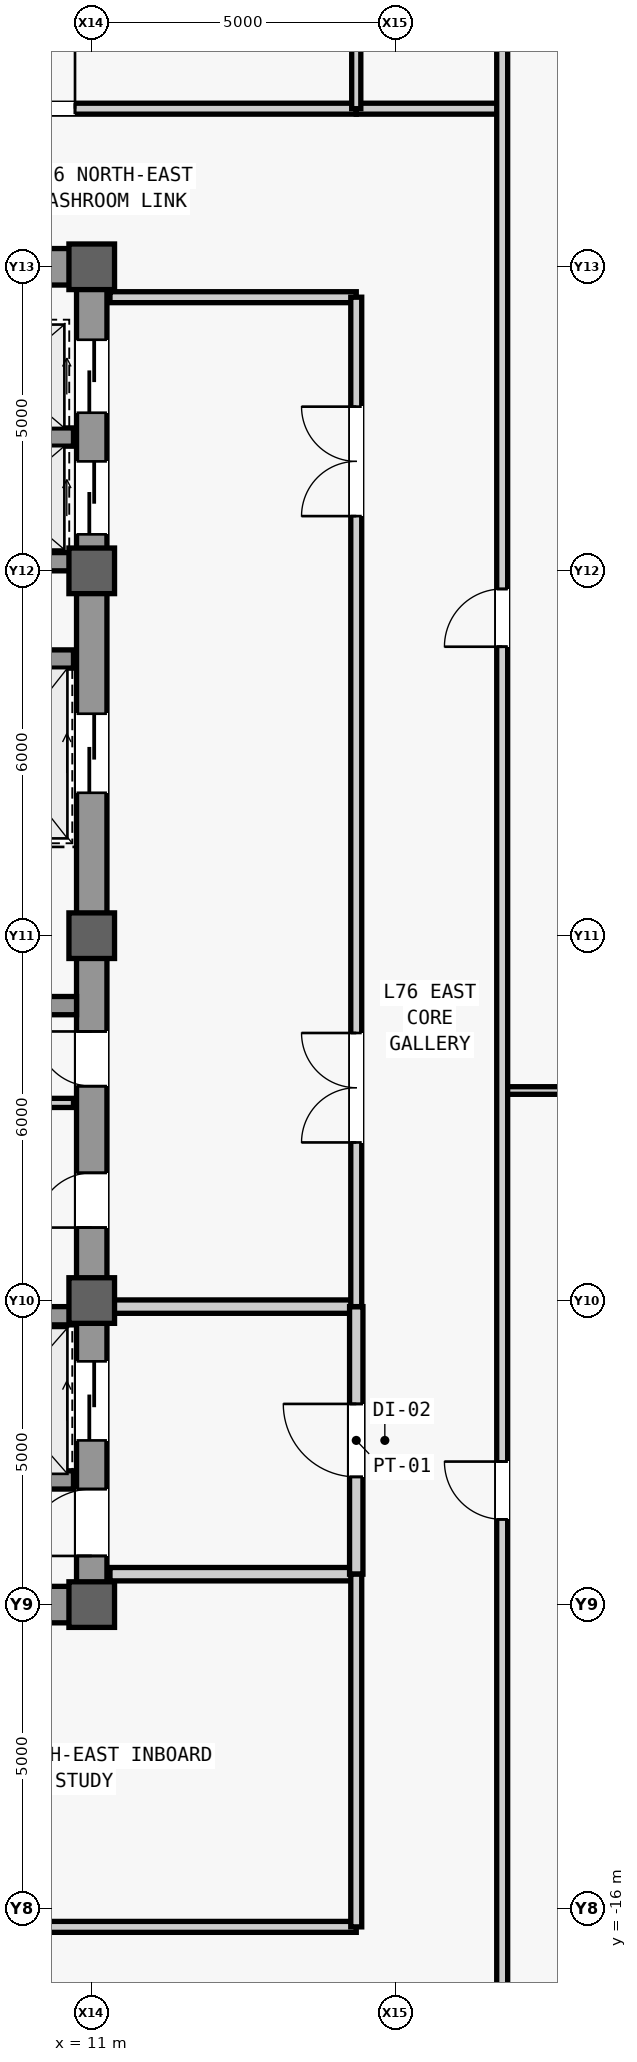
"""IFC4 building model, lengths in metres.
Left out: names, types, materials, properties, quantities, classifications, styles, units other than length and angle.
Written with IfcOpenShell. Run it as: python <this file> out.ifc"""

import sys

from ifc_helpers import new_model, si_unit, direction, frame, frame_2d, origin, origin_2d, place, context, subcontext, project, spatial, rectangle, extrude, source, transform, mapped, element, fill, save


model = new_model("IFC4")
c1 = context("Model", 3, precision=1e-05, world=origin(), true_north=direction((0.0, 1.0)))
c2 = subcontext(c1, "Body", "Model", "MODEL_VIEW")
j1 = project(units=[si_unit("LENGTHUNIT", "METRE"), si_unit("PLANEANGLEUNIT", "RADIAN")], contexts=[c1])
p1 = place(None, origin())
s1 = spatial("IfcSite", under=j1, at=p1, CompositionType="ELEMENT")
p2 = place(p1, origin())
s2 = spatial("IfcBuilding", under=s1, at=p2, CompositionType="ELEMENT")
p3 = place(p2, frame((0.0, 0.0, 321.5)))
s3 = spatial("IfcBuildingStorey", under=s2, at=p3, CompositionType="ELEMENT", Elevation=321.5)
m1 = source(origin(), c2, "Body", "SweptSolid", [
    extrude(rectangle(XDim=22.0, YDim=0.5, at=frame_2d((11.0, 0.0))), origin(), (0.0, 0.0, 1.0), 4.54),
])
p4 = place(p3, frame((11.0, -11.0, 0.0), z_axis=(0.0, 0.0, 1.0), x_axis=(0.0, 1.0, 0.0)))
e1 = element("IfcWall", 1, at=p4, inside=s3, PredefinedType="SHEAR", context=c2, shape_type="MappedRepresentation", body=[
    mapped(m1, transform((0.0, 0.0, 0.0), scale=1.0)),
])
m2 = source(origin(), c2, "Body", "SweptSolid", [
    extrude(rectangle(XDim=1.1, YDim=2.2, at=frame_2d((0.55, 1.1))), frame((0.0, 0.26, 0.0), z_axis=(0.0, -1.0, 0.0), x_axis=(1.0, 0.0, 0.0)), (0.0, 0.0, 1.0), 0.52),
])
p5 = place(p4, frame((0.8, 0.0, 0.0)))
e2 = element("IfcOpeningElement", 2, at=p5, cuts=e1, PredefinedType="OPENING", context=c2, shape_type="MappedRepresentation", body=[
    mapped(m2, transform((0.0, 0.0, 0.0), scale=1.0)),
])
m3 = source(origin(), c2, "Body", "SweptSolid", [
    extrude(rectangle(XDim=0.9, YDim=2.15, at=frame_2d((0.45, 1.075))), frame((0.0, 0.26, 0.0), z_axis=(0.0, -1.0, 0.0), x_axis=(1.0, 0.0, 0.0)), (0.0, 0.0, 1.0), 0.52),
])
p6 = place(p4, frame((6.2, 0.0, 0.0)))
e3 = element("IfcOpeningElement", 3, at=p6, cuts=e1, PredefinedType="OPENING", context=c2, shape_type="MappedRepresentation", body=[
    mapped(m3, transform((0.0, 0.0, 0.0), scale=1.0)),
])
p7 = place(p4, frame((8.525, 0.0, 0.0)))
e4 = element("IfcOpeningElement", 4, at=p7, cuts=e1, PredefinedType="OPENING", context=c2, shape_type="MappedRepresentation", body=[
    mapped(m3, transform((0.0, 0.0, 0.0), scale=1.0)),
])
m4 = source(origin(), c2, "Body", "SweptSolid", [
    extrude(rectangle(XDim=1.2, YDim=2.3, at=frame_2d((0.6, 1.15))), frame((0.0, 0.26, 0.0), z_axis=(0.0, -1.0, 0.0), x_axis=(1.0, 0.0, 0.0)), (0.0, 0.0, 1.0), 0.52),
])
p8 = place(p4, frame((17.6, 0.0, 0.0)))
e5 = element("IfcOpeningElement", 5, at=p8, cuts=e1, PredefinedType="OPENING", context=c2, shape_type="MappedRepresentation", body=[
    mapped(m4, transform((0.0, 0.0, 0.0), scale=1.0)),
])
p9 = place(p4, frame((19.6, 0.0, 0.0)))
e6 = element("IfcOpeningElement", 6, at=p9, cuts=e1, PredefinedType="OPENING", context=c2, shape_type="MappedRepresentation", body=[
    mapped(m4, transform((0.0, 0.0, 0.0), scale=1.0)),
])
m5 = source(origin(), c2, "Body", "SweptSolid", [
    extrude(rectangle(XDim=1.3, YDim=2.3, at=frame_2d((0.65, 1.15))), frame((0.0, 0.26, 0.0), z_axis=(0.0, -1.0, 0.0), x_axis=(1.0, 0.0, 0.0)), (0.0, 0.0, 1.0), 0.52),
])
p10 = place(p4, frame((2.7, 0.0, 0.0)))
e7 = element("IfcOpeningElement", 7, at=p10, cuts=e1, PredefinedType="OPENING", context=c2, shape_type="MappedRepresentation", body=[
    mapped(m5, transform((0.0, 0.0, 0.0), scale=1.0)),
])
p11 = place(p4, frame((13.35, 0.0, 0.0)))
e8 = element("IfcOpeningElement", 8, at=p11, cuts=e1, PredefinedType="OPENING", context=c2, shape_type="MappedRepresentation", body=[
    mapped(m5, transform((0.0, 0.0, 0.0), scale=1.0)),
])
m6 = source(origin(), c2, "Body", "SweptSolid", [
    extrude(rectangle(XDim=5.9, YDim=0.6, at=frame_2d((2.95, 0.0))), origin(), (0.0, 0.0, 1.0), 4.54),
])
p12 = place(p3, frame((4.85, -11.0, 0.0), z_axis=(0.0, 0.0, 1.0), x_axis=(1.0, 0.0, 0.0)))
e9 = element("IfcWall", 9, at=p12, inside=s3, PredefinedType="SHEAR", context=c2, shape_type="MappedRepresentation", body=[
    mapped(m6, transform((0.0, 0.0, 0.0), scale=1.0)),
])
p13 = place(p3, frame((4.85, 11.0, 0.0), z_axis=(0.0, 0.0, 1.0), x_axis=(1.0, 0.0, 0.0)))
e10 = element("IfcWall", 10, at=p13, inside=s3, PredefinedType="SHEAR", context=c2, shape_type="MappedRepresentation", body=[
    mapped(m6, transform((0.0, 0.0, 0.0), scale=1.0)),
])
m7 = source(origin(), c2, "Body", "SweptSolid", [
    extrude(rectangle(XDim=1.05, YDim=2.2, at=frame_2d((0.525, 1.1))), frame((0.0, 0.31, 0.0), z_axis=(0.0, -1.0, 0.0), x_axis=(1.0, 0.0, 0.0)), (0.0, 0.0, 1.0), 0.62),
])
p14 = place(p13, frame((1.375, 0.0, 0.0)))
e11 = element("IfcOpeningElement", 11, at=p14, cuts=e10, PredefinedType="OPENING", context=c2, shape_type="MappedRepresentation", body=[
    mapped(m7, transform((0.0, 0.0, 0.0), scale=1.0)),
])
m8 = source(origin(), c2, "Body", "SweptSolid", [
    extrude(rectangle(XDim=5.65, YDim=0.3, at=frame_2d((2.825, 0.0))), origin(), (0.0, 0.0, 1.0), 4.54),
])
p15 = place(p3, frame((5.1, -1.15, 0.0), z_axis=(0.0, 0.0, 1.0), x_axis=(1.0, 0.0, 0.0)))
e12 = element("IfcWall", 12, at=p15, inside=s3, PredefinedType="SHEAR", context=c2, shape_type="MappedRepresentation", body=[
    mapped(m8, transform((0.0, 0.0, 0.0), scale=1.0)),
])
m9 = source(origin(), c2, "Body", "SweptSolid", [
    extrude(rectangle(XDim=0.75, YDim=0.75, at=origin_2d()), origin(), (0.0, 0.0, 1.0), 4.8),
])
for number, where, z_axis, x_axis in (
    (13, (11.0, -11.0, 0.0), (0.0, 0.0, 1.0), (1.0, 0.0, 0.0)),
    (14, (11.0, -6.0, 0.0), (0.0, 0.0, 1.0), (1.0, 0.0, 0.0)),
    (15, (11.0, 0.0, 0.0), (0.0, 0.0, 1.0), (1.0, 0.0, 0.0)),
    (16, (11.0, 6.0, 0.0), (0.0, 0.0, 1.0), (1.0, 0.0, 0.0)),
    (17, (11.0, 11.0, 0.0), (0.0, 0.0, 1.0), (1.0, 0.0, 0.0)),
):
    element("IfcColumn", number, at=place(p3, frame(where, z_axis=z_axis, x_axis=x_axis)), inside=s3, PredefinedType="COLUMN", context=c2, shape_type="MappedRepresentation", body=[
        mapped(m9, transform((0.0, 0.0, 0.0), scale=1.0)),
    ])
m10 = source(origin(), c2, "Body", "SweptSolid", [
    extrude(rectangle(XDim=2.2, YDim=0.3, at=frame_2d((1.1, 0.0))), origin(), (0.0, 0.0, 1.0), 4.54),
])
for number, where, z_axis, x_axis in (
    (18, (8.5, -8.95, 0.0), (0.0, 0.0, 1.0), (1.0, 0.0, 0.0)),
    (19, (8.5, -6.25, 0.0), (0.0, 0.0, 1.0), (1.0, 0.0, 0.0)),
):
    element("IfcWall", number, at=place(p3, frame(where, z_axis=z_axis, x_axis=x_axis)), inside=s3, PredefinedType="SHEAR", context=c2, shape_type="MappedRepresentation", body=[
        mapped(m10, transform((0.0, 0.0, 0.0), scale=1.0)),
    ])
m11 = source(origin(), c2, "Body", "SweptSolid", [
    extrude(rectangle(XDim=2.3, YDim=0.3, at=frame_2d((1.15, 0.0))), origin(), (0.0, 0.0, 1.0), 4.54),
])
for number, where, z_axis, x_axis in (
    (20, (8.4, 4.55, 0.0), (0.0, 0.0, 1.0), (1.0, 0.0, 0.0)),
    (21, (8.4, 6.15, 0.0), (0.0, 0.0, 1.0), (1.0, 0.0, 0.0)),
    (22, (8.4, 8.2, 0.0), (0.0, 0.0, 1.0), (1.0, 0.0, 0.0)),
):
    element("IfcWall", number, at=place(p3, frame(where, z_axis=z_axis, x_axis=x_axis)), inside=s3, PredefinedType="SHEAR", context=c2, shape_type="MappedRepresentation", body=[
        mapped(m11, transform((0.0, 0.0, 0.0), scale=1.0)),
    ])
m12 = source(origin(), c2, "Body", "SweptSolid", [
    extrude(rectangle(XDim=2.05, YDim=0.15, at=frame_2d((1.025, 0.0))), origin(), (0.0, 0.0, 1.0), 4.54),
])
p16 = place(p3, frame((8.65, -2.75, 0.0), z_axis=(0.0, 0.0, 1.0), x_axis=(1.0, 0.0, 0.0)))
e23 = element("IfcWall", 23, at=p16, inside=s3, PredefinedType="PARTITIONING", context=c2, shape_type="MappedRepresentation", body=[
    mapped(m12, transform((0.0, 0.0, 0.0), scale=1.0)),
])
m13 = source(origin(), c2, "Body", "SweptSolid", [
    extrude(rectangle(XDim=4.05, YDim=0.22, at=frame_2d((2.025, 0.0))), origin(), (0.0, 0.0, 1.0), 4.54),
])
p17 = place(p3, frame((11.3, -10.5, 0.0), z_axis=(0.0, 0.0, 1.0), x_axis=(1.0, 0.0, 0.0)))
e24 = element("IfcWall", 24, at=p17, inside=s3, PredefinedType="PARTITIONING", context=c2, shape_type="MappedRepresentation", body=[
    mapped(m13, transform((0.0, 0.0, 0.0), scale=1.0)),
])
m14 = source(origin(), c2, "Body", "SweptSolid", [
    extrude(rectangle(XDim=4.05, YDim=0.22, at=frame_2d((2.025, 0.0))), origin(), (0.0, 0.0, 1.0), 2.74),
])
p18 = place(p3, frame((11.3, -6.1, 0.0), z_axis=(0.0, 0.0, 1.0), x_axis=(1.0, 0.0, 0.0)))
e25 = element("IfcWall", 25, at=p18, inside=s3, PredefinedType="PARTITIONING", context=c2, shape_type="MappedRepresentation", body=[
    mapped(m14, transform((0.0, 0.0, 0.0), scale=1.0)),
])
m15 = source(origin(), c2, "Body", "SweptSolid", [
    extrude(rectangle(XDim=4.4, YDim=0.22, at=frame_2d((2.2, 0.0))), origin(), (0.0, 0.0, 1.0), 4.54),
])
p19 = place(p3, frame((15.35, -10.5, 0.0), z_axis=(0.0, 0.0, 1.0), x_axis=(0.0, 1.0, 0.0)))
e26 = element("IfcWall", 26, at=p19, inside=s3, PredefinedType="PARTITIONING", context=c2, shape_type="MappedRepresentation", body=[
    mapped(m15, transform((0.0, 0.0, 0.0), scale=1.0)),
])
m16 = source(origin(), c2, "Body", "SweptSolid", [
    extrude(rectangle(XDim=1.2, YDim=2.2, at=frame_2d((0.6, 1.1))), frame((0.0, 0.12, 0.0), z_axis=(0.0, -1.0, 0.0), x_axis=(1.0, 0.0, 0.0)), (0.0, 0.0, 1.0), 0.24),
])
p20 = place(p19, frame((1.6, 0.0, 0.0)))
e27 = element("IfcOpeningElement", 27, at=p20, cuts=e26, PredefinedType="OPENING", context=c2, shape_type="MappedRepresentation", body=[
    mapped(m16, transform((0.0, 0.0, 0.0), scale=1.0)),
])
m17 = source(origin(), c2, "Body", "SweptSolid", [
    extrude(rectangle(XDim=4.05, YDim=0.18, at=frame_2d((2.025, 0.0))), origin(), (0.0, 0.0, 1.0), 4.54),
])
p21 = place(p3, frame((11.3, 10.5, 0.0), z_axis=(0.0, 0.0, 1.0), x_axis=(1.0, 0.0, 0.0)))
e28 = element("IfcWall", 28, at=p21, inside=s3, PredefinedType="PARTITIONING", context=c2, shape_type="MappedRepresentation", body=[
    mapped(m17, transform((0.0, 0.0, 0.0), scale=1.0)),
])
m18 = source(origin(), c2, "Body", "SweptSolid", [
    extrude(rectangle(XDim=16.6, YDim=0.18, at=frame_2d((8.3, 0.0))), origin(), (0.0, 0.0, 1.0), 4.54),
])
p22 = place(p3, frame((15.35, -6.1, 0.0), z_axis=(0.0, 0.0, 1.0), x_axis=(0.0, 1.0, 0.0)))
e29 = element("IfcWall", 29, at=p22, inside=s3, PredefinedType="PARTITIONING", context=c2, shape_type="MappedRepresentation", body=[
    mapped(m18, transform((0.0, 0.0, 0.0), scale=1.0)),
])
m19 = source(origin(), c2, "Body", "SweptSolid", [
    extrude(rectangle(XDim=1.8, YDim=2.25, at=frame_2d((0.9, 1.125))), frame((0.0, 0.1, 0.0), z_axis=(0.0, -1.0, 0.0), x_axis=(1.0, 0.0, 0.0)), (0.0, 0.0, 1.0), 0.2),
])
p23 = place(p22, frame((2.7, 0.0, 0.0)))
e30 = element("IfcOpeningElement", 30, at=p23, cuts=e29, PredefinedType="OPENING", context=c2, shape_type="MappedRepresentation", body=[
    mapped(m19, transform((0.0, 0.0, 0.0), scale=1.0)),
])
p24 = place(p22, frame((13.0, 0.0, 0.0)))
e31 = element("IfcOpeningElement", 31, at=p24, cuts=e29, PredefinedType="OPENING", context=c2, shape_type="MappedRepresentation", body=[
    mapped(m19, transform((0.0, 0.0, 0.0), scale=1.0)),
])
m20 = source(origin(), c2, "Body", "SweptSolid", [
    extrude(rectangle(XDim=14.05, YDim=0.18, at=frame_2d((7.025, 0.0))), origin(), (0.0, 0.0, 1.0), 4.54),
])
p25 = place(p3, frame((1.3, -16.3, 0.0), z_axis=(0.0, 0.0, 1.0), x_axis=(1.0, 0.0, 0.0)))
e32 = element("IfcWall", 32, at=p25, inside=s3, PredefinedType="PARTITIONING", context=c2, shape_type="MappedRepresentation", body=[
    mapped(m20, transform((0.0, 0.0, 0.0), scale=1.0)),
])
m21 = source(origin(), c2, "Body", "SweptSolid", [
    extrude(rectangle(XDim=0.9, YDim=2.15, at=frame_2d((0.45, 1.075))), frame((0.0, 0.1, 0.0), z_axis=(0.0, -1.0, 0.0), x_axis=(1.0, 0.0, 0.0)), (0.0, 0.0, 1.0), 0.2),
])
p26 = place(p25, frame((6.25, 0.0, 0.0)))
e33 = element("IfcOpeningElement", 33, at=p26, cuts=e32, PredefinedType="OPENING", context=c2, shape_type="MappedRepresentation", body=[
    mapped(m21, transform((0.0, 0.0, 0.0), scale=1.0)),
])
m22 = source(origin(), c2, "Body", "SweptSolid", [
    extrude(rectangle(XDim=5.8, YDim=0.18, at=frame_2d((2.9, 0.0))), origin(), (0.0, 0.0, 1.0), 4.54),
])
p27 = place(p3, frame((15.35, -16.3, 0.0), z_axis=(0.0, 0.0, 1.0), x_axis=(0.0, 1.0, 0.0)))
e34 = element("IfcWall", 34, at=p27, inside=s3, PredefinedType="PARTITIONING", context=c2, shape_type="MappedRepresentation", body=[
    mapped(m22, transform((0.0, 0.0, 0.0), scale=1.0)),
])
m23 = source(origin(), c2, "Body", "SweptSolid", [
    extrude(rectangle(XDim=2.4, YDim=0.18, at=frame_2d((1.2, 0.0))), origin(), (0.0, 0.0, 1.0), 4.54),
])
p28 = place(p3, frame((15.35, 13.6, 0.0), z_axis=(0.0, 0.0, 1.0), x_axis=(1.0, 0.0, 0.0)))
e35 = element("IfcWall", 35, at=p28, inside=s3, PredefinedType="PARTITIONING", context=c2, shape_type="MappedRepresentation", body=[
    mapped(m23, transform((0.0, 0.0, 0.0), scale=1.0)),
])
m24 = source(origin(), c2, "Body", "SweptSolid", [
    extrude(rectangle(XDim=32.75, YDim=0.18, at=frame_2d((16.375, 0.0))), origin(), (0.0, 0.0, 1.0), 4.54),
])
p29 = place(p3, frame((-17.4, 13.6, 0.0), z_axis=(0.0, 0.0, 1.0), x_axis=(1.0, 0.0, 0.0)))
e36 = element("IfcWall", 36, at=p29, inside=s3, PredefinedType="PARTITIONING", context=c2, shape_type="MappedRepresentation", body=[
    mapped(m24, transform((0.0, 0.0, 0.0), scale=1.0)),
])
m25 = source(origin(), c2, "Body", "SweptSolid", [
    extrude(rectangle(XDim=1.05, YDim=2.2, at=frame_2d((0.525, 1.1))), frame((0.0, 0.1, 0.0), z_axis=(0.0, -1.0, 0.0), x_axis=(1.0, 0.0, 0.0)), (0.0, 0.0, 1.0), 0.2),
])
p30 = place(p29, frame((27.075, 0.0, 0.0)))
e37 = element("IfcOpeningElement", 37, at=p30, cuts=e36, PredefinedType="OPENING", context=c2, shape_type="MappedRepresentation", body=[
    mapped(m25, transform((0.0, 0.0, 0.0), scale=1.0)),
])
m26 = source(origin(), c2, "Body", "SweptSolid", [
    extrude(rectangle(XDim=14.4, YDim=0.15, at=frame_2d((7.2, 0.0))), origin(), (0.0, 0.0, 1.0), 4.54),
])
p31 = place(p3, frame((15.35, 13.6, 0.0), z_axis=(0.0, 0.0, 1.0), x_axis=(0.0, 1.0, 0.0)))
e38 = element("IfcWall", 38, at=p31, inside=s3, PredefinedType="PARTITIONING", context=c2, shape_type="MappedRepresentation", body=[
    mapped(m26, transform((0.0, 0.0, 0.0), scale=1.0)),
])
m27 = source(origin(), c2, "Body", "SweptSolid", [
    extrude(rectangle(XDim=10.25, YDim=0.125, at=frame_2d((5.125, 0.0))), origin(), (0.0, 0.0, 1.0), 4.54),
])
p32 = place(p3, frame((17.75, -2.546, 0.0), z_axis=(0.0, 0.0, 1.0), x_axis=(1.0, 0.0, 0.0)))
e39 = element("IfcWall", 39, at=p32, inside=s3, PredefinedType="PARTITIONING", context=c2, shape_type="MappedRepresentation", body=[
    mapped(m27, transform((0.0, 0.0, 0.0), scale=1.0)),
])
m28 = source(origin(), c2, "Body", "SweptSolid", [
    extrude(rectangle(XDim=41.2, YDim=0.18, at=frame_2d((20.6, 0.0))), origin(), (0.0, 0.0, 1.0), 4.54),
])
p33 = place(p3, frame((17.75, -18.7, 0.0), z_axis=(0.0, 0.0, 1.0), x_axis=(0.0, 1.0, 0.0)))
e40 = element("IfcWall", 40, at=p33, inside=s3, PredefinedType="PARTITIONING", context=c2, shape_type="MappedRepresentation", body=[
    mapped(m28, transform((0.0, 0.0, 0.0), scale=1.0)),
])
m29 = source(origin(), c2, "Body", "SweptSolid", [
    extrude(rectangle(XDim=0.95, YDim=2.15, at=frame_2d((0.475, 1.075))), frame((0.0, 0.1, 0.0), z_axis=(0.0, -1.0, 0.0), x_axis=(1.0, 0.0, 0.0)), (0.0, 0.0, 1.0), 0.2),
])
p34 = place(p33, frame((9.102, 0.0, 0.0)))
e41 = element("IfcOpeningElement", 41, at=p34, cuts=e40, PredefinedType="OPENING", context=c2, shape_type="MappedRepresentation", body=[
    mapped(m29, transform((0.0, 0.0, 0.0), scale=1.0)),
])
p35 = place(p33, frame((23.452, 0.0, 0.0)))
e42 = element("IfcOpeningElement", 42, at=p35, cuts=e40, PredefinedType="OPENING", context=c2, shape_type="MappedRepresentation", body=[
    mapped(m29, transform((0.0, 0.0, 0.0), scale=1.0)),
])
m30 = source(origin(), c2, "Body", "SweptSolid", [
    extrude(rectangle(XDim=1.1, YDim=2.2, at=frame_2d((0.55, 1.1))), frame((0.0, 0.025, 0.0), z_axis=(0.0, -1.0, 0.0), x_axis=(1.0, 0.0, 0.0)), (0.0, 0.0, 1.0), 0.05),
])
p36 = place(p5, origin())
e43 = element("IfcDoor", 43, at=p36, inside=s3, OperationType="SINGLE_SWING_LEFT", PredefinedType="DOOR", context=c2, shape_type="MappedRepresentation", body=[
    mapped(m30, transform((0.0, 0.0, 0.0), scale=1.0)),
])
fill(e2, e43)
m31 = source(origin(), c2, "Body", "SweptSolid", [
    extrude(rectangle(XDim=0.9, YDim=2.15, at=frame_2d((0.45, 1.075))), frame((0.0, 0.025, 0.0), z_axis=(0.0, -1.0, 0.0), x_axis=(1.0, 0.0, 0.0)), (0.0, 0.0, 1.0), 0.05),
])
p37 = place(p6, origin())
e44 = element("IfcDoor", 44, at=p37, inside=s3, OperationType="SINGLE_SWING_LEFT", PredefinedType="DOOR", context=c2, shape_type="MappedRepresentation", body=[
    mapped(m31, transform((0.0, 0.0, 0.0), scale=1.0)),
])
fill(e3, e44)
p38 = place(p7, origin())
e45 = element("IfcDoor", 45, at=p38, inside=s3, OperationType="SINGLE_SWING_RIGHT", PredefinedType="DOOR", context=c2, shape_type="MappedRepresentation", body=[
    mapped(m31, transform((0.0, 0.0, 0.0), scale=1.0)),
])
fill(e4, e45)
m32 = source(origin(), c2, "Body", "SweptSolid", [
    extrude(rectangle(XDim=1.2, YDim=2.2, at=frame_2d((0.6, 1.1))), frame((0.0, 0.025, 0.0), z_axis=(0.0, -1.0, 0.0), x_axis=(1.0, 0.0, 0.0)), (0.0, 0.0, 1.0), 0.05),
])
p39 = place(p20, origin())
e46 = element("IfcDoor", 46, at=p39, inside=s3, OperationType="SINGLE_SWING_RIGHT", PredefinedType="DOOR", context=c2, shape_type="MappedRepresentation", body=[
    mapped(m32, transform((0.0, 0.0, 0.0), scale=1.0)),
])
fill(e27, e46)
m33 = source(origin(), c2, "Body", "SweptSolid", [
    extrude(rectangle(XDim=1.8, YDim=2.25, at=frame_2d((0.9, 1.125))), frame((0.0, 0.025, 0.0), z_axis=(0.0, -1.0, 0.0), x_axis=(1.0, 0.0, 0.0)), (0.0, 0.0, 1.0), 0.05),
])
p40 = place(p23, origin())
e47 = element("IfcDoor", 47, at=p40, inside=s3, OperationType="SINGLE_SWING_RIGHT", PredefinedType="DOOR", context=c2, shape_type="MappedRepresentation", body=[
    mapped(m33, transform((0.0, 0.0, 0.0), scale=1.0)),
])
fill(e30, e47)
p41 = place(p24, origin())
e48 = element("IfcDoor", 48, at=p41, inside=s3, OperationType="SINGLE_SWING_LEFT", PredefinedType="DOOR", context=c2, shape_type="MappedRepresentation", body=[
    mapped(m33, transform((0.0, 0.0, 0.0), scale=1.0)),
])
fill(e31, e48)
m34 = source(origin(), c2, "Body", "SweptSolid", [
    extrude(rectangle(XDim=1.05, YDim=2.2, at=frame_2d((0.525, 1.1))), frame((0.0, 0.025, 0.0), z_axis=(0.0, -1.0, 0.0), x_axis=(1.0, 0.0, 0.0)), (0.0, 0.0, 1.0), 0.05),
])
p42 = place(p30, origin())
e49 = element("IfcDoor", 49, at=p42, inside=s3, OperationType="SINGLE_SWING_RIGHT", PredefinedType="DOOR", context=c2, shape_type="MappedRepresentation", body=[
    mapped(m34, transform((0.0, 0.0, 0.0), scale=1.0)),
])
fill(e37, e49)
m35 = source(origin(), c2, "Body", "SweptSolid", [
    extrude(rectangle(XDim=0.95, YDim=2.15, at=frame_2d((0.475, 1.075))), frame((0.0, 0.025, 0.0), z_axis=(0.0, -1.0, 0.0), x_axis=(1.0, 0.0, 0.0)), (0.0, 0.0, 1.0), 0.05),
])
p43 = place(p34, origin())
e50 = element("IfcDoor", 50, at=p43, inside=s3, OperationType="SINGLE_SWING_RIGHT", PredefinedType="DOOR", context=c2, shape_type="MappedRepresentation", body=[
    mapped(m35, transform((0.0, 0.0, 0.0), scale=1.0)),
])
fill(e41, e50)
p44 = place(p35, origin())
e51 = element("IfcDoor", 51, at=p44, inside=s3, OperationType="SINGLE_SWING_LEFT", PredefinedType="DOOR", context=c2, shape_type="MappedRepresentation", body=[
    mapped(m35, transform((0.0, 0.0, 0.0), scale=1.0)),
])
fill(e42, e51)
m36 = source(origin(), c2, "Body", "SweptSolid", [
    extrude(rectangle(XDim=1.2, YDim=2.3, at=frame_2d((0.6, 1.15))), frame((0.0, 0.025, 0.0), z_axis=(0.0, -1.0, 0.0), x_axis=(1.0, 0.0, 0.0)), (0.0, 0.0, 1.0), 0.05),
])
p45 = place(p8, origin())
e52 = element("IfcDoor", 52, at=p45, inside=s3, OperationType="SLIDING_TO_LEFT", PredefinedType="DOOR", context=c2, shape_type="MappedRepresentation", body=[
    mapped(m36, transform((0.0, 0.0, 0.0), scale=1.0)),
])
fill(e5, e52)
p46 = place(p9, origin())
e53 = element("IfcDoor", 53, at=p46, inside=s3, OperationType="SLIDING_TO_LEFT", PredefinedType="DOOR", context=c2, shape_type="MappedRepresentation", body=[
    mapped(m36, transform((0.0, 0.0, 0.0), scale=1.0)),
])
fill(e6, e53)
m37 = source(origin(), c2, "Body", "SweptSolid", [
    extrude(rectangle(XDim=1.3, YDim=2.3, at=frame_2d((0.65, 1.15))), frame((0.0, 0.025, 0.0), z_axis=(0.0, -1.0, 0.0), x_axis=(1.0, 0.0, 0.0)), (0.0, 0.0, 1.0), 0.05),
])
p47 = place(p10, origin())
e54 = element("IfcDoor", 54, at=p47, inside=s3, OperationType="SLIDING_TO_LEFT", PredefinedType="DOOR", context=c2, shape_type="MappedRepresentation", body=[
    mapped(m37, transform((0.0, 0.0, 0.0), scale=1.0)),
])
fill(e7, e54)
p48 = place(p11, origin())
e55 = element("IfcDoor", 55, at=p48, inside=s3, OperationType="SLIDING_TO_LEFT", PredefinedType="DOOR", context=c2, shape_type="MappedRepresentation", body=[
    mapped(m37, transform((0.0, 0.0, 0.0), scale=1.0)),
])
fill(e8, e55)
save(model, sys.argv[1])
